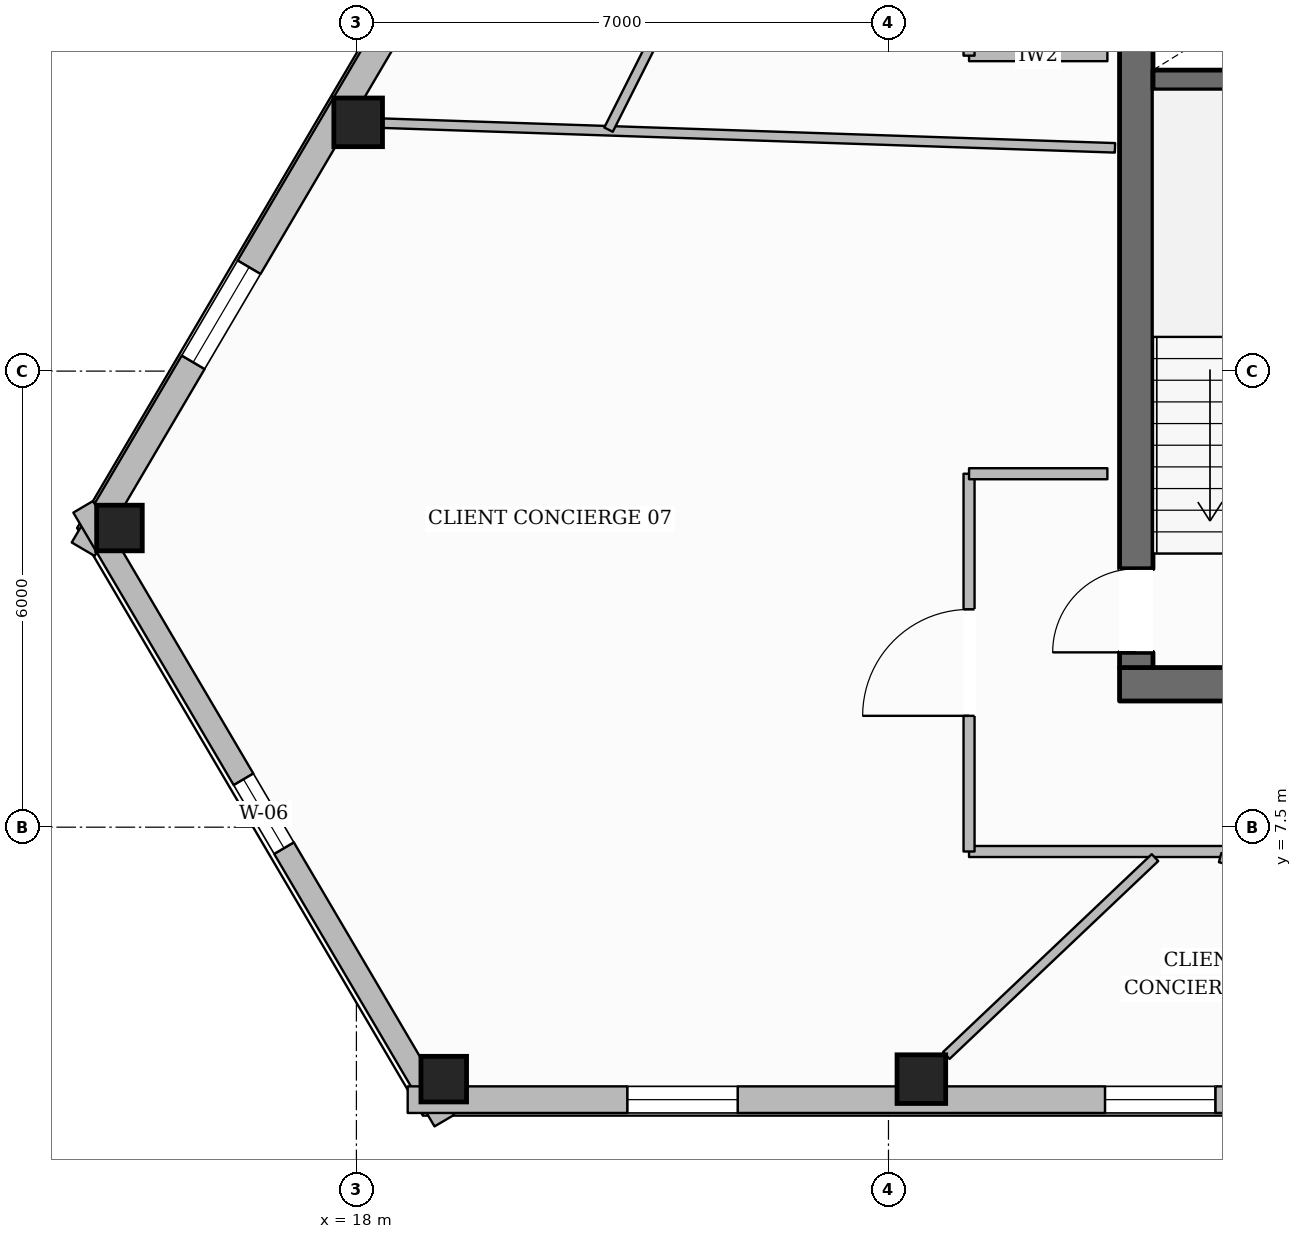
"""IFC4 building model, lengths in metres.
Left out: names, types, materials, properties, quantities, classifications, styles, units other than length and angle.
Written with IfcOpenShell. Run it as: python <this file> out.ifc"""

import sys

from ifc_helpers import new_model, si_unit, direction, frame, frame_2d, origin, origin_2d, place, context, subcontext, project, spatial, rectangle, hollow_rectangle, extrude, element, fill, save


model = new_model("IFC4")
c1 = context("Model", 3, precision=1e-05, world=origin(), true_north=direction((0.0, 1.0)))
c2 = subcontext(c1, "Body", "Model", "MODEL_VIEW")
j1 = project(units=[si_unit("LENGTHUNIT", "METRE"), si_unit("PLANEANGLEUNIT", "RADIAN")], contexts=[c1])
p1 = place(None, origin())
s1 = spatial("IfcSite", under=j1, at=p1, CompositionType="ELEMENT")
p2 = place(p1, origin())
s2 = spatial("IfcBuilding", under=s1, at=p2, CompositionType="ELEMENT")
p3 = place(p2, frame((0.0, 0.0, 203.5)))
s3 = spatial("IfcBuildingStorey", under=s2, at=p3, CompositionType="ELEMENT", Elevation=203.5)
p4 = place(p3, frame((28.04, 9.38, 0.0), z_axis=(0.0, 0.0, 1.0), x_axis=(1.0, 0.0, 0.0)))
e1 = element("IfcWall", 1, at=p4, inside=s3, PredefinedType="SOLIDWALL", context=c2, shape_type="SweptSolid", body=[
    extrude(rectangle(XDim=19.92, YDim=0.44, at=frame_2d((9.96, 0.0))), origin(), (0.0, 0.0, 1.0), 3.6),
])
p5 = place(p4, frame((10.46, 0.0, 0.0)))
e2 = element("IfcOpeningElement", 2, at=p5, cuts=e1, PredefinedType="OPENING", context=c2, shape_type="SweptSolid", body=[
    extrude(rectangle(XDim=1.4, YDim=2.2, at=frame_2d((0.7, 1.1))), frame((0.0, 0.23, 0.0), z_axis=(0.0, -1.0, 0.0), x_axis=(1.0, 0.0, 0.0)), (0.0, 0.0, 1.0), 0.46),
])
p6 = place(p3, frame((28.26, 9.6, 0.0), z_axis=(0.0, 0.0, 1.0), x_axis=(0.0, 1.0, 0.0)))
e3 = element("IfcWall", 3, at=p6, inside=s3, PredefinedType="SOLIDWALL", context=c2, shape_type="SweptSolid", body=[
    extrude(rectangle(XDim=13.0, YDim=0.44, at=frame_2d((6.5, 0.0))), origin(), (0.0, 0.0, 1.0), 3.6),
])
p7 = place(p6, frame((0.2, 0.0, 0.0)))
e4 = element("IfcOpeningElement", 4, at=p7, cuts=e3, PredefinedType="OPENING", context=c2, shape_type="SweptSolid", body=[
    extrude(rectangle(XDim=1.1, YDim=2.15, at=frame_2d((0.55, 1.075))), frame((0.0, 0.23, 0.0), z_axis=(0.0, -1.0, 0.0), x_axis=(1.0, 0.0, 0.0)), (0.0, 0.0, 1.0), 0.46),
])
p8 = place(p6, frame((8.4, 0.0, 0.0)))
e5 = element("IfcOpeningElement", 5, at=p8, cuts=e3, PredefinedType="OPENING", context=c2, shape_type="SweptSolid", body=[
    extrude(rectangle(XDim=0.9, YDim=2.1, at=frame_2d((0.45, 1.05))), frame((0.0, 0.23, 0.0), z_axis=(0.0, -1.0, 0.0), x_axis=(1.0, 0.0, 0.0)), (0.0, 0.0, 1.0), 0.46),
])
p9 = place(p3, frame((28.48, 17.33, 0.0), z_axis=(0.0, 0.0, 1.0), x_axis=(1.0, 0.0, 0.0)))
e6 = element("IfcWall", 6, at=p9, inside=s3, PredefinedType="SHEAR", context=c2, shape_type="SweptSolid", body=[
    extrude(rectangle(XDim=3.2, YDim=0.26, at=frame_2d((1.6, 0.0))), origin(), (0.0, 0.0, 1.0), 3.6),
])
p10 = place(p3, frame((18.023, 16.773, 0.0), z_axis=(0.0, 0.0, 1.0), x_axis=(1.0, 0.0, 0.0)))
e7 = element("IfcColumn", 7, at=p10, inside=s3, PredefinedType="COLUMN", context=c2, shape_type="SweptSolid", body=[
    extrude(hollow_rectangle(XDim=0.64, YDim=0.64, WallThickness=0.028, at=origin_2d()), origin(), (0.0, 0.0, 1.0), 3.6),
])
for number, where, z_axis, x_axis in (
    (8, (14.883, 11.436, 0.0), (0.0, 0.0, 1.0), (1.0, 0.0, 0.0)),
    (9, (19.149, 4.185, 0.0), (0.0, 0.0, 1.0), (1.0, 0.0, 0.0)),
):
    element("IfcColumn", number, at=place(p3, frame(where, z_axis=z_axis, x_axis=x_axis)), inside=s3, PredefinedType="COLUMN", context=c2, shape_type="SweptSolid", body=[
        extrude(hollow_rectangle(XDim=0.6, YDim=0.6, WallThickness=0.028, at=origin_2d()), origin(), (0.0, 0.0, 1.0), 3.6),
    ])
p11 = place(p3, frame((25.433, 4.185, 0.0), z_axis=(0.0, 0.0, 1.0), x_axis=(1.0, 0.0, 0.0)))
e10 = element("IfcColumn", 10, at=p11, inside=s3, PredefinedType="COLUMN", context=c2, shape_type="SweptSolid", body=[
    extrude(hollow_rectangle(XDim=0.64, YDim=0.64, WallThickness=0.028, at=origin_2d()), origin(), (0.0, 0.0, 1.0), 3.6),
])
p12 = place(p3, frame((14.405, 11.157, 0.0), z_axis=(0.0, 0.0, 1.0), x_axis=(0.507147779291, 0.861859112593, 0.0)))
e11 = element("IfcWall", 11, at=p12, inside=s3, PredefinedType="STANDARD", context=c2, shape_type="SweptSolid", body=[
    extrude(rectangle(XDim=38.111, YDim=0.35, at=frame_2d((19.056, 0.0))), origin(), (0.0, 0.0, 1.0), 3.132),
])
p13 = place(p12, frame((33.816, 0.0, 0.65)))
e12 = element("IfcOpeningElement", 12, at=p13, cuts=e11, PredefinedType="OPENING", context=c2, shape_type="SweptSolid", body=[
    extrude(rectangle(XDim=1.45, YDim=1.75, at=frame_2d((0.725, 0.875))), frame((0.0, 0.185, 0.0), z_axis=(0.0, -1.0, 0.0), x_axis=(1.0, 0.0, 0.0)), (0.0, 0.0, 1.0), 0.37),
])
p14 = place(p12, frame((27.623, 0.0, 0.65)))
e13 = element("IfcOpeningElement", 13, at=p14, cuts=e11, PredefinedType="OPENING", context=c2, shape_type="SweptSolid", body=[
    extrude(rectangle(XDim=1.45, YDim=1.75, at=frame_2d((0.725, 0.875))), frame((0.0, 0.185, 0.0), z_axis=(0.0, -1.0, 0.0), x_axis=(1.0, 0.0, 0.0)), (0.0, 0.0, 1.0), 0.37),
])
p15 = place(p12, frame((15.239, 0.0, 0.65)))
e14 = element("IfcOpeningElement", 14, at=p15, cuts=e11, PredefinedType="OPENING", context=c2, shape_type="SweptSolid", body=[
    extrude(rectangle(XDim=1.45, YDim=1.75, at=frame_2d((0.725, 0.875))), frame((0.0, 0.185, 0.0), z_axis=(0.0, -1.0, 0.0), x_axis=(1.0, 0.0, 0.0)), (0.0, 0.0, 1.0), 0.37),
])
p16 = place(p12, frame((9.046, 0.0, 0.65)))
e15 = element("IfcOpeningElement", 15, at=p16, cuts=e11, PredefinedType="OPENING", context=c2, shape_type="SweptSolid", body=[
    extrude(rectangle(XDim=1.45, YDim=1.75, at=frame_2d((0.725, 0.875))), frame((0.0, 0.185, 0.0), z_axis=(0.0, -1.0, 0.0), x_axis=(1.0, 0.0, 0.0)), (0.0, 0.0, 1.0), 0.37),
])
p17 = place(p12, frame((2.854, 0.0, 0.65)))
e16 = element("IfcOpeningElement", 16, at=p17, cuts=e11, PredefinedType="OPENING", context=c2, shape_type="SweptSolid", body=[
    extrude(rectangle(XDim=1.45, YDim=1.75, at=frame_2d((0.725, 0.875))), frame((0.0, 0.185, 0.0), z_axis=(0.0, -1.0, 0.0), x_axis=(1.0, 0.0, 0.0)), (0.0, 0.0, 1.0), 0.37),
])
p18 = place(p3, frame((19.157, 3.639, 0.0), z_axis=(0.0, 0.0, 1.0), x_axis=(-0.507146520789, 0.861859853138, 0.0)))
e17 = element("IfcWall", 17, at=p18, inside=s3, PredefinedType="STANDARD", context=c2, shape_type="SweptSolid", body=[
    extrude(rectangle(XDim=9.369, YDim=0.3, at=frame_2d((4.685, 0.0))), origin(), (0.0, 0.0, 1.0), 3.132),
])
p19 = place(p18, frame((4.16, 0.0, 0.65)))
e18 = element("IfcOpeningElement", 18, at=p19, cuts=e17, PredefinedType="OPENING", context=c2, shape_type="SweptSolid", body=[
    extrude(rectangle(XDim=1.05, YDim=1.7, at=frame_2d((0.525, 0.85))), frame((0.0, 0.16, 0.0), z_axis=(0.0, -1.0, 0.0), x_axis=(1.0, 0.0, 0.0)), (0.0, 0.0, 1.0), 0.32),
])
p20 = place(p3, frame((57.325, 3.915, 0.0), z_axis=(0.0, 0.0, 1.0), x_axis=(-1.0, 0.0, 0.0)))
e19 = element("IfcWall", 19, at=p20, inside=s3, PredefinedType="STANDARD", context=c2, shape_type="SweptSolid", body=[
    extrude(rectangle(XDim=38.651, YDim=0.35, at=frame_2d((19.325, 0.0))), origin(), (0.0, 0.0, 1.0), 3.132),
])
p21 = place(p20, frame((34.31, 0.0, 0.65)))
e20 = element("IfcOpeningElement", 20, at=p21, cuts=e19, PredefinedType="OPENING", context=c2, shape_type="SweptSolid", body=[
    extrude(rectangle(XDim=1.45, YDim=1.75, at=frame_2d((0.725, 0.875))), frame((0.0, 0.185, 0.0), z_axis=(0.0, -1.0, 0.0), x_axis=(1.0, 0.0, 0.0)), (0.0, 0.0, 1.0), 0.37),
])
p22 = place(p20, frame((28.026, 0.0, 0.65)))
e21 = element("IfcOpeningElement", 21, at=p22, cuts=e19, PredefinedType="OPENING", context=c2, shape_type="SweptSolid", body=[
    extrude(rectangle(XDim=1.45, YDim=1.75, at=frame_2d((0.725, 0.875))), frame((0.0, 0.185, 0.0), z_axis=(0.0, -1.0, 0.0), x_axis=(1.0, 0.0, 0.0)), (0.0, 0.0, 1.0), 0.37),
])
p23 = place(p20, frame((15.458, 0.0, 0.65)))
e22 = element("IfcOpeningElement", 22, at=p23, cuts=e19, PredefinedType="OPENING", context=c2, shape_type="SweptSolid", body=[
    extrude(rectangle(XDim=1.45, YDim=1.75, at=frame_2d((0.725, 0.875))), frame((0.0, 0.185, 0.0), z_axis=(0.0, -1.0, 0.0), x_axis=(1.0, 0.0, 0.0)), (0.0, 0.0, 1.0), 0.37),
])
p24 = place(p20, frame((9.175, 0.0, 0.65)))
e23 = element("IfcOpeningElement", 23, at=p24, cuts=e19, PredefinedType="OPENING", context=c2, shape_type="SweptSolid", body=[
    extrude(rectangle(XDim=1.45, YDim=1.75, at=frame_2d((0.725, 0.875))), frame((0.0, 0.185, 0.0), z_axis=(0.0, -1.0, 0.0), x_axis=(1.0, 0.0, 0.0)), (0.0, 0.0, 1.0), 0.37),
])
p25 = place(p20, frame((2.891, 0.0, 0.65)))
e24 = element("IfcOpeningElement", 24, at=p25, cuts=e19, PredefinedType="OPENING", context=c2, shape_type="SweptSolid", body=[
    extrude(rectangle(XDim=1.45, YDim=1.75, at=frame_2d((0.725, 0.875))), frame((0.0, 0.185, 0.0), z_axis=(0.0, -1.0, 0.0), x_axis=(1.0, 0.0, 0.0)), (0.0, 0.0, 1.0), 0.37),
])
p26 = place(p3, frame((27.88, 17.65, 0.0), z_axis=(0.0, 0.0, 1.0), x_axis=(-1.0, 0.0, 0.0)))
e25 = element("IfcWall", 25, at=p26, inside=s3, PredefinedType="PARTITIONING", context=c2, shape_type="SweptSolid", body=[
    extrude(rectangle(XDim=1.82, YDim=0.145, at=frame_2d((0.91, 0.0))), origin(), (0.0, 0.0, 1.0), 3.6),
])
p27 = place(p3, frame((26.06, 17.65, 0.0), z_axis=(0.0, 0.0, 1.0), x_axis=(0.0, 1.0, 0.0)))
e26 = element("IfcWall", 26, at=p27, inside=s3, PredefinedType="PARTITIONING", context=c2, shape_type="SweptSolid", body=[
    extrude(rectangle(XDim=7.37, YDim=0.145, at=frame_2d((3.685, 0.0))), origin(), (0.0, 0.0, 1.0), 3.339),
])
p28 = place(p27, frame((3.195, 0.0, 0.0)))
e27 = element("IfcOpeningElement", 27, at=p28, cuts=e26, PredefinedType="OPENING", context=c2, shape_type="SweptSolid", body=[
    extrude(rectangle(XDim=0.98, YDim=2.15, at=frame_2d((0.49, 1.075))), frame((0.0, 0.083, 0.0), z_axis=(0.0, -1.0, 0.0), x_axis=(1.0, 0.0, 0.0)), (0.0, 0.0, 1.0), 0.165),
])
p29 = place(p3, frame((49.94, 7.18, 0.0), z_axis=(0.0, 0.0, 1.0), x_axis=(-1.0, 0.0, 0.0)))
e28 = element("IfcWall", 28, at=p29, inside=s3, PredefinedType="PARTITIONING", context=c2, shape_type="SweptSolid", body=[
    extrude(rectangle(XDim=23.88, YDim=0.145, at=frame_2d((11.94, 0.0))), origin(), (0.0, 0.0, 1.0), 3.6),
])
p30 = place(p29, frame((12.995, 0.0, 0.0)))
e29 = element("IfcOpeningElement", 29, at=p30, cuts=e28, PredefinedType="OPENING", context=c2, shape_type="SweptSolid", body=[
    extrude(rectangle(XDim=0.98, YDim=2.15, at=frame_2d((0.49, 1.075))), frame((0.0, 0.083, 0.0), z_axis=(0.0, -1.0, 0.0), x_axis=(1.0, 0.0, 0.0)), (0.0, 0.0, 1.0), 0.165),
])
p31 = place(p29, frame((2.991, 0.0, 0.0)))
e30 = element("IfcOpeningElement", 30, at=p31, cuts=e28, PredefinedType="OPENING", context=c2, shape_type="SweptSolid", body=[
    extrude(rectangle(XDim=0.98, YDim=2.15, at=frame_2d((0.49, 1.075))), frame((0.0, 0.083, 0.0), z_axis=(0.0, -1.0, 0.0), x_axis=(1.0, 0.0, 0.0)), (0.0, 0.0, 1.0), 0.165),
])
p32 = place(p3, frame((26.06, 7.18, 0.0), z_axis=(0.0, 0.0, 1.0), x_axis=(0.0, 1.0, 0.0)))
e31 = element("IfcWall", 31, at=p32, inside=s3, PredefinedType="PARTITIONING", context=c2, shape_type="SweptSolid", body=[
    extrude(rectangle(XDim=4.97, YDim=0.145, at=frame_2d((2.485, 0.0))), origin(), (0.0, 0.0, 1.0), 3.6),
])
p33 = place(p32, frame((1.785, 0.0, 0.0)))
e32 = element("IfcOpeningElement", 32, at=p33, cuts=e31, PredefinedType="OPENING", context=c2, shape_type="SweptSolid", body=[
    extrude(rectangle(XDim=1.4, YDim=2.2, at=frame_2d((0.7, 1.1))), frame((0.0, 0.083, 0.0), z_axis=(0.0, -1.0, 0.0), x_axis=(1.0, 0.0, 0.0)), (0.0, 0.0, 1.0), 0.165),
])
p34 = place(p3, frame((26.06, 12.15, 0.0), z_axis=(0.0, 0.0, 1.0), x_axis=(1.0, 0.0, 0.0)))
e33 = element("IfcWall", 33, at=p34, inside=s3, PredefinedType="PARTITIONING", context=c2, shape_type="SweptSolid", body=[
    extrude(rectangle(XDim=1.82, YDim=0.145, at=frame_2d((0.91, 0.0))), origin(), (0.0, 0.0, 1.0), 3.6),
])
p35 = place(p3, frame((27.98, 16.438, 0.0), z_axis=(0.0, 0.0, 1.0), x_axis=(-0.999433600002, 0.033652328114, 0.0)))
e34 = element("IfcWall", 34, at=p35, inside=s3, PredefinedType="PARTITIONING", context=c2, shape_type="SweptSolid", body=[
    extrude(rectangle(XDim=9.634, YDim=0.125, at=frame_2d((4.817, 0.0))), origin(), (0.0, 0.0, 1.0), 3.141),
])
p36 = place(p3, frame((28.507, 7.1, 0.0), z_axis=(0.0, 0.0, 1.0), x_axis=(-0.725696611607, -0.688014845698, 0.0)))
e35 = element("IfcWall", 35, at=p36, inside=s3, PredefinedType="PARTITIONING", context=c2, shape_type="SweptSolid", body=[
    extrude(rectangle(XDim=3.784, YDim=0.125, at=frame_2d((1.892, 0.0))), origin(), (0.0, 0.0, 1.0), 3.6),
])
p37 = place(p3, frame((28.541, 31.023, 0.0), z_axis=(0.0, 0.0, 1.0), x_axis=(-0.449722790535, -0.893168187786, 0.0)))
e36 = element("IfcWall", 36, at=p37, inside=s3, PredefinedType="PARTITIONING", context=c2, shape_type="SweptSolid", body=[
    extrude(rectangle(XDim=16.062, YDim=0.125, at=frame_2d((8.031, 0.0))), origin(), (0.0, 0.0, 1.0), 3.339),
])
p38 = place(p37, frame((7.548, 0.0, 0.0)))
e37 = element("IfcOpeningElement", 37, at=p38, cuts=e36, PredefinedType="OPENING", context=c2, shape_type="SweptSolid", body=[
    extrude(rectangle(XDim=0.98, YDim=2.15, at=frame_2d((0.49, 1.075))), frame((0.0, 0.073, 0.0), z_axis=(0.0, -1.0, 0.0), x_axis=(1.0, 0.0, 0.0)), (0.0, 0.0, 1.0), 0.145),
])
p39 = place(p3, frame((29.363, 7.1, 0.0), z_axis=(0.0, 0.0, 1.0), x_axis=(0.967094155668, -0.254418737661, 0.0)))
e38 = element("IfcWall", 38, at=p39, inside=s3, PredefinedType="PARTITIONING", context=c2, shape_type="SweptSolid", body=[
    extrude(rectangle(XDim=11.927, YDim=0.125, at=frame_2d((5.963, 0.0))), origin(), (0.0, 0.0, 1.0), 3.135),
])
p40 = place(p39, frame((6.966, 0.0, 0.0)))
e39 = element("IfcOpeningElement", 39, at=p40, cuts=e38, PredefinedType="OPENING", context=c2, shape_type="SweptSolid", body=[
    extrude(rectangle(XDim=0.98, YDim=2.15, at=frame_2d((0.49, 1.075))), frame((0.0, 0.073, 0.0), z_axis=(0.0, -1.0, 0.0), x_axis=(1.0, 0.0, 0.0)), (0.0, 0.0, 1.0), 0.145),
])
p41 = place(p17, origin())
e40 = element("IfcWindow", 40, at=p41, inside=s3, PartitioningType="SINGLE_PANEL", PredefinedType="WINDOW", context=c2, shape_type="SweptSolid", body=[
    extrude(rectangle(XDim=1.45, YDim=1.75, at=frame_2d((0.725, 0.875))), frame((0.0, 0.03, 0.0), z_axis=(0.0, -1.0, 0.0), x_axis=(1.0, 0.0, 0.0)), (0.0, 0.0, 1.0), 0.06),
])
fill(e16, e40)
p42 = place(p21, origin())
e41 = element("IfcWindow", 41, at=p42, inside=s3, PartitioningType="SINGLE_PANEL", PredefinedType="WINDOW", context=c2, shape_type="SweptSolid", body=[
    extrude(rectangle(XDim=1.45, YDim=1.75, at=frame_2d((0.725, 0.875))), frame((0.0, 0.03, 0.0), z_axis=(0.0, -1.0, 0.0), x_axis=(1.0, 0.0, 0.0)), (0.0, 0.0, 1.0), 0.06),
])
fill(e20, e41)
p43 = place(p22, origin())
e42 = element("IfcWindow", 42, at=p43, inside=s3, PartitioningType="SINGLE_PANEL", PredefinedType="WINDOW", context=c2, shape_type="SweptSolid", body=[
    extrude(rectangle(XDim=1.45, YDim=1.75, at=frame_2d((0.725, 0.875))), frame((0.0, 0.03, 0.0), z_axis=(0.0, -1.0, 0.0), x_axis=(1.0, 0.0, 0.0)), (0.0, 0.0, 1.0), 0.06),
])
fill(e21, e42)
p44 = place(p19, origin())
e43 = element("IfcWindow", 43, at=p44, inside=s3, PartitioningType="SINGLE_PANEL", PredefinedType="WINDOW", context=c2, shape_type="SweptSolid", body=[
    extrude(rectangle(XDim=1.05, YDim=1.7, at=frame_2d((0.525, 0.85))), frame((0.0, 0.03, 0.0), z_axis=(0.0, -1.0, 0.0), x_axis=(1.0, 0.0, 0.0)), (0.0, 0.0, 1.0), 0.06),
])
fill(e18, e43)
p45 = place(p7, origin())
e44 = element("IfcDoor", 44, at=p45, inside=s3, OperationType="SINGLE_SWING_LEFT", PredefinedType="DOOR", context=c2, shape_type="SweptSolid", body=[
    extrude(rectangle(XDim=1.1, YDim=2.15, at=frame_2d((0.55, 1.075))), frame((0.0, 0.025, 0.0), z_axis=(0.0, -1.0, 0.0), x_axis=(1.0, 0.0, 0.0)), (0.0, 0.0, 1.0), 0.05),
])
fill(e4, e44)
p46 = place(p33, origin())
e45 = element("IfcDoor", 45, at=p46, inside=s3, OperationType="SINGLE_SWING_LEFT", PredefinedType="DOOR", context=c2, shape_type="SweptSolid", body=[
    extrude(rectangle(XDim=1.4, YDim=2.2, at=frame_2d((0.7, 1.1))), frame((0.0, 0.025, 0.0), z_axis=(0.0, -1.0, 0.0), x_axis=(1.0, 0.0, 0.0)), (0.0, 0.0, 1.0), 0.05),
])
fill(e32, e45)
save(model, sys.argv[1])
